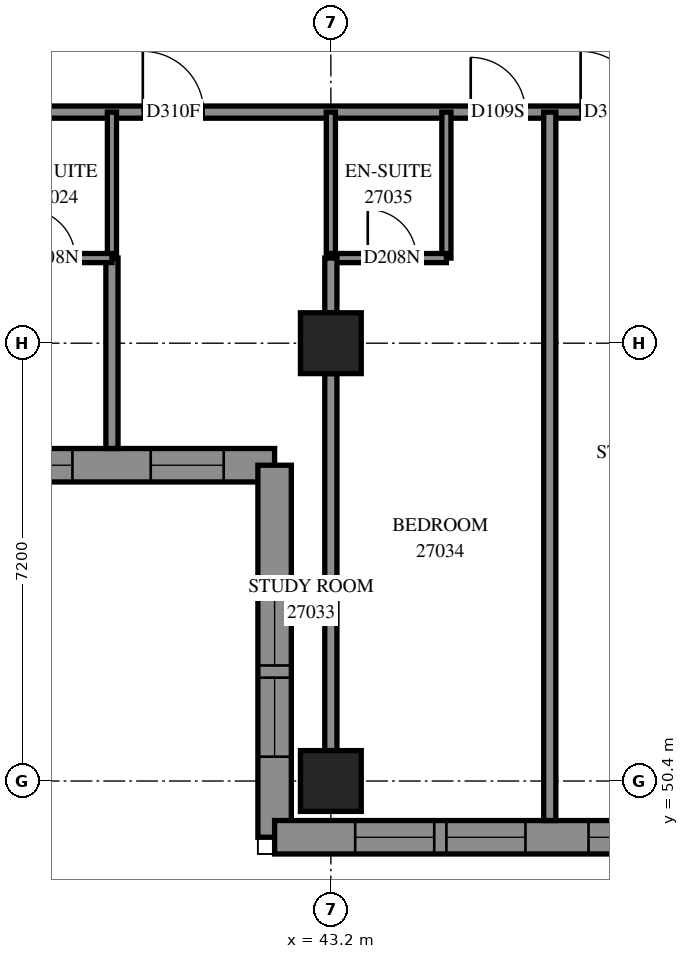
"""IFC4 building model, lengths in metres.
Left out: names, types, materials, properties, quantities, classifications, styles, units other than length and angle.
Written with IfcOpenShell. Run it as: python <this file> out.ifc"""

import sys

from ifc_helpers import new_model, si_unit, direction, frame, frame_2d, origin, origin_2d, place, context, subcontext, project, spatial, polyline, rectangle, outline, extrude, element, fill, save


model = new_model("IFC4")
c1 = context("Model", 3, precision=1e-05, world=origin(), true_north=direction((0.0, 1.0)))
c2 = subcontext(c1, "Body", "Model", "MODEL_VIEW")
j1 = project(units=[si_unit("LENGTHUNIT", "METRE"), si_unit("PLANEANGLEUNIT", "RADIAN")], contexts=[c1])
p1 = place(None, origin())
s1 = spatial("IfcSite", under=j1, at=p1, CompositionType="ELEMENT")
p2 = place(p1, origin())
s2 = spatial("IfcBuilding", under=s1, at=p2, CompositionType="ELEMENT")
p3 = place(p2, frame((0.0, 0.0, 101.6)))
s3 = spatial("IfcBuildingStorey", under=s2, at=p3, CompositionType="ELEMENT", Elevation=101.6)
for number, where, z_axis, x_axis in (
    (1, (43.2, 50.4, 0.0), (0.0, 0.0, 1.0), (1.0, 0.0, 0.0)),
    (2, (43.2, 57.6, 0.0), (0.0, 0.0, 1.0), (1.0, 0.0, 0.0)),
):
    element("IfcColumn", number, at=place(p3, frame(where, z_axis=z_axis, x_axis=x_axis)), inside=s3, PredefinedType="COLUMN", context=c2, shape_type="SweptSolid", body=[
        extrude(rectangle(XDim=1.0, YDim=1.0, at=origin_2d()), origin(), (0.0, 0.0, 1.0), 3.1),
    ])
p4 = place(p3, frame((27.875, 55.593, 0.0), z_axis=(0.0, 0.0, 1.0), x_axis=(1.0, 0.0, 0.0)))
e3 = element("IfcWall", 3, at=p4, inside=s3, PredefinedType="SOLIDWALL", context=c2, shape_type="SweptSolid", body=[
    extrude(outline(polyline([(-0.275, -0.275), (14.125, -0.275), (14.675, 0.275), (0.275, 0.275), (-0.275, -0.275)])), origin(), (0.0, 0.0, 1.0), 3.1),
])
p5 = place(p4, frame((1.175, 0.0, 0.5)))
e4 = element("IfcOpeningElement", 4, at=p5, cuts=e3, PredefinedType="OPENING", context=c2, shape_type="SweptSolid", body=[
    extrude(rectangle(XDim=1.3, YDim=2.45, at=frame_2d((0.65, 1.225))), frame((0.0, 0.285, 0.0), z_axis=(0.0, -1.0, 0.0), x_axis=(1.0, 0.0, 0.0)), (0.0, 0.0, 1.0), 0.57),
])
p6 = place(p4, frame((2.675, 0.0, 0.5)))
e5 = element("IfcOpeningElement", 5, at=p6, cuts=e3, PredefinedType="OPENING", context=c2, shape_type="SweptSolid", body=[
    extrude(rectangle(XDim=1.3, YDim=2.45, at=frame_2d((0.65, 1.225))), frame((0.0, 0.285, 0.0), z_axis=(0.0, -1.0, 0.0), x_axis=(1.0, 0.0, 0.0)), (0.0, 0.0, 1.0), 0.57),
])
p7 = place(p4, frame((4.925, 0.0, 0.5)))
e6 = element("IfcOpeningElement", 6, at=p7, cuts=e3, PredefinedType="OPENING", context=c2, shape_type="SweptSolid", body=[
    extrude(rectangle(XDim=1.3, YDim=2.45, at=frame_2d((0.65, 1.225))), frame((0.0, 0.285, 0.0), z_axis=(0.0, -1.0, 0.0), x_axis=(1.0, 0.0, 0.0)), (0.0, 0.0, 1.0), 0.57),
])
p8 = place(p4, frame((6.425, 0.0, 0.5)))
e7 = element("IfcOpeningElement", 7, at=p8, cuts=e3, PredefinedType="OPENING", context=c2, shape_type="SweptSolid", body=[
    extrude(rectangle(XDim=1.3, YDim=2.45, at=frame_2d((0.65, 1.225))), frame((0.0, 0.285, 0.0), z_axis=(0.0, -1.0, 0.0), x_axis=(1.0, 0.0, 0.0)), (0.0, 0.0, 1.0), 0.57),
])
p9 = place(p4, frame((8.275, 0.0, 0.5)))
e8 = element("IfcOpeningElement", 8, at=p9, cuts=e3, PredefinedType="OPENING", context=c2, shape_type="SweptSolid", body=[
    extrude(rectangle(XDim=1.3, YDim=2.45, at=frame_2d((0.65, 1.225))), frame((0.0, 0.285, 0.0), z_axis=(0.0, -1.0, 0.0), x_axis=(1.0, 0.0, 0.0)), (0.0, 0.0, 1.0), 0.57),
])
p10 = place(p4, frame((9.775, 0.0, 0.5)))
e9 = element("IfcOpeningElement", 9, at=p10, cuts=e3, PredefinedType="OPENING", context=c2, shape_type="SweptSolid", body=[
    extrude(rectangle(XDim=1.3, YDim=2.45, at=frame_2d((0.65, 1.225))), frame((0.0, 0.285, 0.0), z_axis=(0.0, -1.0, 0.0), x_axis=(1.0, 0.0, 0.0)), (0.0, 0.0, 1.0), 0.57),
])
p11 = place(p4, frame((12.363, 0.0, 0.5)))
e10 = element("IfcOpeningElement", 10, at=p11, cuts=e3, PredefinedType="OPENING", context=c2, shape_type="SweptSolid", body=[
    extrude(rectangle(XDim=1.2, YDim=2.45, at=frame_2d((0.6, 1.225))), frame((0.0, 0.285, 0.0), z_axis=(0.0, -1.0, 0.0), x_axis=(1.0, 0.0, 0.0)), (0.0, 0.0, 1.0), 0.57),
])
p12 = place(p3, frame((42.275, 55.593, 0.0), z_axis=(0.0, 0.0, 1.0), x_axis=(0.0, -1.0, 0.0)))
e11 = element("IfcWall", 11, at=p12, inside=s3, PredefinedType="SOLIDWALL", context=c2, shape_type="SweptSolid", body=[
    extrude(outline(polyline([(0.275, -0.275), (6.393, -0.275), (5.843, 0.275), (-0.275, 0.275), (0.275, -0.275)])), origin(), (0.0, 0.0, 1.0), 3.1),
])
p13 = place(p12, frame((1.993, 0.0, 0.5)))
e12 = element("IfcOpeningElement", 12, at=p13, cuts=e11, PredefinedType="OPENING", context=c2, shape_type="SweptSolid", body=[
    extrude(rectangle(XDim=1.3, YDim=2.45, at=frame_2d((0.65, 1.225))), frame((0.0, 0.285, 0.0), z_axis=(0.0, -1.0, 0.0), x_axis=(1.0, 0.0, 0.0)), (0.0, 0.0, 1.0), 0.57),
])
p14 = place(p12, frame((3.493, 0.0, 0.5)))
e13 = element("IfcOpeningElement", 13, at=p14, cuts=e11, PredefinedType="OPENING", context=c2, shape_type="SweptSolid", body=[
    extrude(rectangle(XDim=1.3, YDim=2.45, at=frame_2d((0.65, 1.225))), frame((0.0, 0.285, 0.0), z_axis=(0.0, -1.0, 0.0), x_axis=(1.0, 0.0, 0.0)), (0.0, 0.0, 1.0), 0.57),
])
p15 = place(p3, frame((42.275, 49.475, 0.0), z_axis=(0.0, 0.0, 1.0), x_axis=(1.0, 0.0, 0.0)))
e14 = element("IfcWall", 14, at=p15, inside=s3, PredefinedType="SOLIDWALL", context=c2, shape_type="SweptSolid", body=[
    extrude(outline(polyline([(-0.275, -0.275), (6.925, -0.275), (7.475, 0.275), (0.275, 0.275), (-0.275, -0.275)])), origin(), (0.0, 0.0, 1.0), 3.1),
])
p16 = place(p15, frame((1.325, 0.0, 0.5)))
e15 = element("IfcOpeningElement", 15, at=p16, cuts=e14, PredefinedType="OPENING", context=c2, shape_type="SweptSolid", body=[
    extrude(rectangle(XDim=1.3, YDim=2.45, at=frame_2d((0.65, 1.225))), frame((0.0, 0.285, 0.0), z_axis=(0.0, -1.0, 0.0), x_axis=(1.0, 0.0, 0.0)), (0.0, 0.0, 1.0), 0.57),
])
p17 = place(p15, frame((2.825, 0.0, 0.5)))
e16 = element("IfcOpeningElement", 16, at=p17, cuts=e14, PredefinedType="OPENING", context=c2, shape_type="SweptSolid", body=[
    extrude(rectangle(XDim=1.3, YDim=2.45, at=frame_2d((0.65, 1.225))), frame((0.0, 0.285, 0.0), z_axis=(0.0, -1.0, 0.0), x_axis=(1.0, 0.0, 0.0)), (0.0, 0.0, 1.0), 0.57),
])
p18 = place(p15, frame((5.162, 0.0, 0.5)))
e17 = element("IfcOpeningElement", 17, at=p18, cuts=e14, PredefinedType="OPENING", context=c2, shape_type="SweptSolid", body=[
    extrude(rectangle(XDim=1.2, YDim=2.45, at=frame_2d((0.6, 1.225))), frame((0.0, 0.285, 0.0), z_axis=(0.0, -1.0, 0.0), x_axis=(1.0, 0.0, 0.0)), (0.0, 0.0, 1.0), 0.57),
])
p19 = place(p3, frame((28.8, 61.4, 0.0), z_axis=(0.0, 0.0, 1.0), x_axis=(1.0, 0.0, 0.0)))
e18 = element("IfcWall", 18, at=p19, inside=s3, PredefinedType="PARTITIONING", context=c2, shape_type="SweptSolid", body=[
    extrude(rectangle(XDim=24.2, YDim=0.2, at=frame_2d((12.1, 0.0))), origin(), (0.0, 0.0, 1.0), 3.1),
])
p20 = place(p19, frame((2.3, 0.0, 0.0)))
e19 = element("IfcOpeningElement", 19, at=p20, cuts=e18, PredefinedType="OPENING", context=c2, shape_type="SweptSolid", body=[
    extrude(rectangle(XDim=0.9, YDim=2.1, at=frame_2d((0.45, 1.05))), frame((0.0, 0.11, 0.0), z_axis=(0.0, -1.0, 0.0), x_axis=(1.0, 0.0, 0.0)), (0.0, 0.0, 1.0), 0.22),
])
p21 = place(p19, frame((5.901, 0.0, 0.0)))
e20 = element("IfcOpeningElement", 20, at=p21, cuts=e18, PredefinedType="OPENING", context=c2, shape_type="SweptSolid", body=[
    extrude(rectangle(XDim=0.9, YDim=2.1, at=frame_2d((0.45, 1.05))), frame((0.0, 0.11, 0.0), z_axis=(0.0, -1.0, 0.0), x_axis=(1.0, 0.0, 0.0)), (0.0, 0.0, 1.0), 0.22),
])
p22 = place(p19, frame((11.307, 0.0, 0.0)))
e21 = element("IfcOpeningElement", 21, at=p22, cuts=e18, PredefinedType="OPENING", context=c2, shape_type="SweptSolid", body=[
    extrude(rectangle(XDim=1.0, YDim=2.1, at=frame_2d((0.5, 1.05))), frame((0.0, 0.11, 0.0), z_axis=(0.0, -1.0, 0.0), x_axis=(1.0, 0.0, 0.0)), (0.0, 0.0, 1.0), 0.22),
])
p23 = place(p19, frame((16.7, 0.0, 0.0)))
e22 = element("IfcOpeningElement", 22, at=p23, cuts=e18, PredefinedType="OPENING", context=c2, shape_type="SweptSolid", body=[
    extrude(rectangle(XDim=0.9, YDim=2.1, at=frame_2d((0.45, 1.05))), frame((0.0, 0.11, 0.0), z_axis=(0.0, -1.0, 0.0), x_axis=(1.0, 0.0, 0.0)), (0.0, 0.0, 1.0), 0.22),
])
p24 = place(p19, frame((18.508, 0.0, 0.0)))
e23 = element("IfcOpeningElement", 23, at=p24, cuts=e18, PredefinedType="OPENING", context=c2, shape_type="SweptSolid", body=[
    extrude(rectangle(XDim=1.0, YDim=2.1, at=frame_2d((0.5, 1.05))), frame((0.0, 0.11, 0.0), z_axis=(0.0, -1.0, 0.0), x_axis=(1.0, 0.0, 0.0)), (0.0, 0.0, 1.0), 0.22),
])
p25 = place(p19, frame((23.074, 0.0, 0.0)))
e24 = element("IfcOpeningElement", 24, at=p25, cuts=e18, PredefinedType="OPENING", context=c2, shape_type="SweptSolid", body=[
    extrude(rectangle(XDim=1.0, YDim=2.1, at=frame_2d((0.5, 1.05))), frame((0.0, 0.11, 0.0), z_axis=(0.0, -1.0, 0.0), x_axis=(1.0, 0.0, 0.0)), (0.0, 0.0, 1.0), 0.22),
])
p26 = place(p3, frame((46.8, 49.75, 0.0), z_axis=(0.0, 0.0, 1.0), x_axis=(0.0, 1.0, 0.0)))
e25 = element("IfcWall", 25, at=p26, inside=s3, PredefinedType="PARTITIONING", context=c2, shape_type="SweptSolid", body=[
    extrude(rectangle(XDim=11.65, YDim=0.2, at=frame_2d((5.825, 0.0))), origin(), (0.0, 0.0, 1.0), 3.1),
])
p27 = place(p3, frame((43.2, 50.9, 0.0), z_axis=(0.0, 0.0, 1.0), x_axis=(0.0, 1.0, 0.0)))
e26 = element("IfcWall", 26, at=p27, inside=s3, PredefinedType="PARTITIONING", context=c2, shape_type="SweptSolid", body=[
    extrude(rectangle(XDim=6.2, YDim=0.2, at=frame_2d((3.1, 0.0))), origin(), (0.0, 0.0, 1.0), 2.6),
])
p28 = place(p3, frame((39.6, 55.868, 0.0), z_axis=(0.0, 0.0, 1.0), x_axis=(0.0, 1.0, 0.0)))
e27 = element("IfcWall", 27, at=p28, inside=s3, PredefinedType="PARTITIONING", context=c2, shape_type="SweptSolid", body=[
    extrude(rectangle(XDim=3.132, YDim=0.2, at=frame_2d((1.566, 0.0))), origin(), (0.0, 0.0, 1.0), 3.1),
])
for number, where, z_axis, x_axis in (
    (28, (39.6, 59.0, 0.0), (0.0, 0.0, 1.0), (0.0, 1.0, 0.0)),
    (29, (45.1, 59.0, 0.0), (0.0, 0.0, 1.0), (0.0, 1.0, 0.0)),
    (30, (43.2, 59.0, 0.0), (0.0, 0.0, 1.0), (0.0, 1.0, 0.0)),
):
    element("IfcWall", number, at=place(p3, frame(where, z_axis=z_axis, x_axis=x_axis)), inside=s3, PredefinedType="PARTITIONING", context=c2, shape_type="SweptSolid", body=[
        extrude(rectangle(XDim=2.4, YDim=0.15, at=frame_2d((1.2, 0.0))), origin(), (0.0, 0.0, 1.0), 3.1),
    ])
p29 = place(p3, frame((37.7, 59.0, 0.0), z_axis=(0.0, 0.0, 1.0), x_axis=(1.0, 0.0, 0.0)))
e31 = element("IfcWall", 31, at=p29, inside=s3, PredefinedType="PARTITIONING", context=c2, shape_type="SweptSolid", body=[
    extrude(rectangle(XDim=1.9, YDim=0.15, at=frame_2d((0.95, 0.0))), origin(), (0.0, 0.0, 1.0), 3.1),
])
p30 = place(p29, frame((0.493, 0.0, 0.0)))
e32 = element("IfcOpeningElement", 32, at=p30, cuts=e31, PredefinedType="OPENING", context=c2, shape_type="SweptSolid", body=[
    extrude(rectangle(XDim=0.8, YDim=2.1, at=frame_2d((0.4, 1.05))), frame((0.0, 0.085, 0.0), z_axis=(0.0, -1.0, 0.0), x_axis=(1.0, 0.0, 0.0)), (0.0, 0.0, 1.0), 0.17),
])
p31 = place(p3, frame((43.2, 59.0, 0.0), z_axis=(0.0, 0.0, 1.0), x_axis=(1.0, 0.0, 0.0)))
e33 = element("IfcWall", 33, at=p31, inside=s3, PredefinedType="PARTITIONING", context=c2, shape_type="SweptSolid", body=[
    extrude(rectangle(XDim=1.9, YDim=0.15, at=frame_2d((0.95, 0.0))), origin(), (0.0, 0.0, 1.0), 3.1),
])
p32 = place(p31, frame((0.607, 0.0, 0.0)))
e34 = element("IfcOpeningElement", 34, at=p32, cuts=e33, PredefinedType="OPENING", context=c2, shape_type="SweptSolid", body=[
    extrude(rectangle(XDim=0.8, YDim=2.1, at=frame_2d((0.4, 1.05))), frame((0.0, 0.085, 0.0), z_axis=(0.0, -1.0, 0.0), x_axis=(1.0, 0.0, 0.0)), (0.0, 0.0, 1.0), 0.17),
])
p33 = place(p3, frame((43.2, 58.1, 0.0), z_axis=(0.0, 0.0, 1.0), x_axis=(0.0, 1.0, 0.0)))
e35 = element("IfcWall", 35, at=p33, inside=s3, PredefinedType="PARTITIONING", context=c2, shape_type="SweptSolid", body=[
    extrude(rectangle(XDim=0.9, YDim=0.2, at=frame_2d((0.45, 0.0))), origin(), (0.0, 0.0, 1.0), 3.1),
])
p34 = place(p10, origin())
e36 = element("IfcWindow", 36, at=p34, inside=s3, PartitioningType="SINGLE_PANEL", PredefinedType="WINDOW", context=c2, shape_type="SweptSolid", body=[
    extrude(rectangle(XDim=1.3, YDim=2.45, at=frame_2d((0.65, 1.225))), frame((0.0, 0.155, 0.0), z_axis=(0.0, -1.0, 0.0), x_axis=(1.0, 0.0, 0.0)), (0.0, 0.0, 1.0), 0.06),
])
fill(e9, e36)
p35 = place(p11, origin())
e37 = element("IfcWindow", 37, at=p35, inside=s3, PartitioningType="SINGLE_PANEL", PredefinedType="WINDOW", context=c2, shape_type="SweptSolid", body=[
    extrude(rectangle(XDim=1.2, YDim=2.45, at=frame_2d((0.6, 1.225))), frame((0.0, 0.155, 0.0), z_axis=(0.0, -1.0, 0.0), x_axis=(1.0, 0.0, 0.0)), (0.0, 0.0, 1.0), 0.06),
])
fill(e10, e37)
p36 = place(p13, origin())
e38 = element("IfcWindow", 38, at=p36, inside=s3, PartitioningType="SINGLE_PANEL", PredefinedType="WINDOW", context=c2, shape_type="SweptSolid", body=[
    extrude(rectangle(XDim=1.3, YDim=2.45, at=frame_2d((0.65, 1.225))), frame((0.0, 0.155, 0.0), z_axis=(0.0, -1.0, 0.0), x_axis=(1.0, 0.0, 0.0)), (0.0, 0.0, 1.0), 0.06),
])
fill(e12, e38)
p37 = place(p14, origin())
e39 = element("IfcWindow", 39, at=p37, inside=s3, PartitioningType="SINGLE_PANEL", PredefinedType="WINDOW", context=c2, shape_type="SweptSolid", body=[
    extrude(rectangle(XDim=1.3, YDim=2.45, at=frame_2d((0.65, 1.225))), frame((0.0, 0.155, 0.0), z_axis=(0.0, -1.0, 0.0), x_axis=(1.0, 0.0, 0.0)), (0.0, 0.0, 1.0), 0.06),
])
fill(e13, e39)
p38 = place(p16, origin())
e40 = element("IfcWindow", 40, at=p38, inside=s3, PartitioningType="SINGLE_PANEL", PredefinedType="WINDOW", context=c2, shape_type="SweptSolid", body=[
    extrude(rectangle(XDim=1.3, YDim=2.45, at=frame_2d((0.65, 1.225))), frame((0.0, 0.155, 0.0), z_axis=(0.0, -1.0, 0.0), x_axis=(1.0, 0.0, 0.0)), (0.0, 0.0, 1.0), 0.06),
])
fill(e15, e40)
p39 = place(p17, origin())
e41 = element("IfcWindow", 41, at=p39, inside=s3, PartitioningType="SINGLE_PANEL", PredefinedType="WINDOW", context=c2, shape_type="SweptSolid", body=[
    extrude(rectangle(XDim=1.3, YDim=2.45, at=frame_2d((0.65, 1.225))), frame((0.0, 0.155, 0.0), z_axis=(0.0, -1.0, 0.0), x_axis=(1.0, 0.0, 0.0)), (0.0, 0.0, 1.0), 0.06),
])
fill(e16, e41)
p40 = place(p18, origin())
e42 = element("IfcWindow", 42, at=p40, inside=s3, PartitioningType="SINGLE_PANEL", PredefinedType="WINDOW", context=c2, shape_type="SweptSolid", body=[
    extrude(rectangle(XDim=1.2, YDim=2.45, at=frame_2d((0.6, 1.225))), frame((0.0, 0.155, 0.0), z_axis=(0.0, -1.0, 0.0), x_axis=(1.0, 0.0, 0.0)), (0.0, 0.0, 1.0), 0.06),
])
fill(e17, e42)
p41 = place(p30, origin())
e43 = element("IfcDoor", 43, at=p41, inside=s3, OperationType="SINGLE_SWING_RIGHT", PredefinedType="DOOR", context=c2, shape_type="SweptSolid", body=[
    extrude(rectangle(XDim=0.8, YDim=2.1, at=frame_2d((0.4, 1.05))), frame((0.0, 0.025, 0.0), z_axis=(0.0, -1.0, 0.0), x_axis=(1.0, 0.0, 0.0)), (0.0, 0.0, 1.0), 0.05),
])
fill(e32, e43)
p42 = place(p22, origin())
e44 = element("IfcDoor", 44, at=p42, inside=s3, OperationType="SINGLE_SWING_RIGHT", PredefinedType="DOOR", context=c2, shape_type="SweptSolid", body=[
    extrude(rectangle(XDim=1.0, YDim=2.1, at=frame_2d((0.5, 1.05))), frame((0.0, 0.025, 0.0), z_axis=(0.0, -1.0, 0.0), x_axis=(1.0, 0.0, 0.0)), (0.0, 0.0, 1.0), 0.05),
])
fill(e21, e44)
p43 = place(p23, origin())
e45 = element("IfcDoor", 45, at=p43, inside=s3, OperationType="SINGLE_SWING_LEFT", PredefinedType="DOOR", context=c2, shape_type="SweptSolid", body=[
    extrude(rectangle(XDim=0.9, YDim=2.1, at=frame_2d((0.45, 1.05))), frame((0.0, 0.025, 0.0), z_axis=(0.0, -1.0, 0.0), x_axis=(1.0, 0.0, 0.0)), (0.0, 0.0, 1.0), 0.05),
])
fill(e22, e45)
p44 = place(p32, origin())
e46 = element("IfcDoor", 46, at=p44, inside=s3, OperationType="SINGLE_SWING_RIGHT", PredefinedType="DOOR", context=c2, shape_type="SweptSolid", body=[
    extrude(rectangle(XDim=0.8, YDim=2.1, at=frame_2d((0.4, 1.05))), frame((0.0, 0.025, 0.0), z_axis=(0.0, -1.0, 0.0), x_axis=(1.0, 0.0, 0.0)), (0.0, 0.0, 1.0), 0.05),
])
fill(e34, e46)
p45 = place(p24, origin())
e47 = element("IfcDoor", 47, at=p45, inside=s3, OperationType="SINGLE_SWING_RIGHT", PredefinedType="DOOR", context=c2, shape_type="SweptSolid", body=[
    extrude(rectangle(XDim=1.0, YDim=2.1, at=frame_2d((0.5, 1.05))), frame((0.0, 0.025, 0.0), z_axis=(0.0, -1.0, 0.0), x_axis=(1.0, 0.0, 0.0)), (0.0, 0.0, 1.0), 0.05),
])
fill(e23, e47)
save(model, sys.argv[1])
